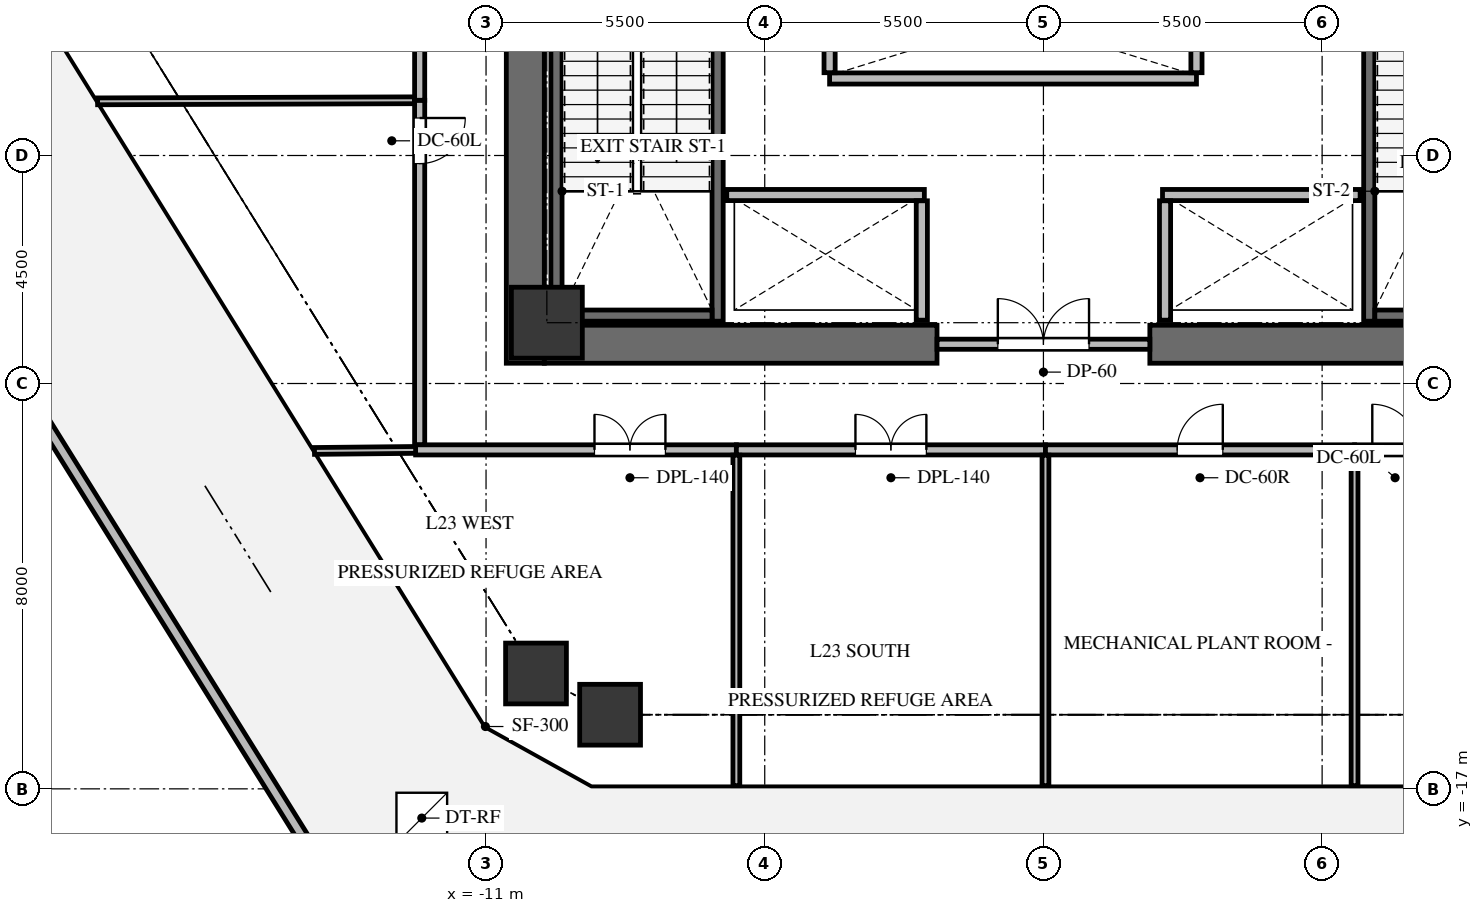
"""IFC4 building model, lengths in metres.
Left out: names, types, materials, properties, quantities, classifications, styles, units other than length and angle.
Written with IfcOpenShell. Run it as: python <this file> out.ifc"""

import sys

from ifc_helpers import new_model, si_unit, direction, frame, frame_2d, origin, origin_2d, place, context, subcontext, project, spatial, rectangle, extrude, source, transform, mapped, element, fill, save


model = new_model("IFC4")
c1 = context("Model", 3, precision=1e-05, world=origin(), true_north=direction((0.0, 1.0)))
c2 = subcontext(c1, "Body", "Model", "MODEL_VIEW")
j1 = project(units=[si_unit("LENGTHUNIT", "METRE"), si_unit("PLANEANGLEUNIT", "RADIAN")], contexts=[c1])
p1 = place(None, origin())
s1 = spatial("IfcSite", under=j1, at=p1, CompositionType="ELEMENT")
p2 = place(p1, origin())
s2 = spatial("IfcBuilding", under=s1, at=p2, CompositionType="ELEMENT")
p3 = place(p2, frame((0.0, 0.0, 88.5)))
s3 = spatial("IfcBuildingStorey", under=s2, at=p3, CompositionType="ELEMENT", Elevation=88.5)
p4 = place(p3, frame((-10.225, -8.6, 0.0), z_axis=(0.0, 0.0, 1.0), x_axis=(0.0, 1.0, 0.0)))
e1 = element("IfcWall", 1, at=p4, inside=s3, PredefinedType="SHEAR", context=c2, shape_type="SweptSolid", body=[
    extrude(rectangle(XDim=17.2, YDim=0.75, at=frame_2d((8.6, 0.0))), origin(), (0.0, 0.0, 1.0), 4.8),
])
for number, where, z_axis, x_axis in (
    (2, (-9.85, -8.225, 0.0), (0.0, 0.0, 1.0), (1.0, 0.0, 0.0)),
    (3, (2.1, -8.225, 0.0), (0.0, 0.0, 1.0), (1.0, 0.0, 0.0)),
):
    element("IfcWall", number, at=place(p3, frame(where, z_axis=z_axis, x_axis=x_axis)), inside=s3, PredefinedType="SHEAR", context=c2, shape_type="SweptSolid", body=[
        extrude(rectangle(XDim=7.75, YDim=0.75, at=frame_2d((3.875, 0.0))), origin(), (0.0, 0.0, 1.0), 4.8),
    ])
p5 = place(p3, frame((-6.43, -7.77, -0.3), z_axis=(0.0, 0.0, 1.0), x_axis=(0.0, 1.0, 0.0)))
e4 = element("IfcWall", 4, at=p5, inside=s3, PredefinedType="SHEAR", context=c2, shape_type="SweptSolid", body=[
    extrude(rectangle(XDim=7.89, YDim=0.22, at=frame_2d((3.945, 0.0))), origin(), (0.0, 0.0, 1.0), 4.8),
])
p6 = place(p5, frame((6.32, 0.0, 0.0)))
e5 = element("IfcOpeningElement", 5, at=p6, cuts=e4, PredefinedType="OPENING", context=c2, shape_type="SweptSolid", body=[
    extrude(rectangle(XDim=1.05, YDim=2.15, at=frame_2d((0.525, 1.075))), frame((0.0, 0.12, 0.0), z_axis=(0.0, -1.0, 0.0), x_axis=(1.0, 0.0, 0.0)), (0.0, 0.0, 1.0), 0.24),
])
p7 = place(p3, frame((-9.61, 0.12, -0.3), z_axis=(0.0, 0.0, 1.0), x_axis=(0.0, -1.0, 0.0)))
e6 = element("IfcWall", 6, at=p7, inside=s3, PredefinedType="SHEAR", context=c2, shape_type="SweptSolid", body=[
    extrude(rectangle(XDim=7.89, YDim=0.22, at=frame_2d((3.945, 0.0))), origin(), (0.0, 0.0, 1.0), 4.8),
])
p8 = place(p3, frame((-9.5, -7.66, -0.3), z_axis=(0.0, 0.0, 1.0), x_axis=(1.0, 0.0, 0.0)))
e7 = element("IfcWall", 7, at=p8, inside=s3, PredefinedType="SHEAR", context=c2, shape_type="SweptSolid", body=[
    extrude(rectangle(XDim=2.96, YDim=0.22, at=frame_2d((1.48, 0.0))), origin(), (0.0, 0.0, 1.0), 4.8),
])
p9 = place(p3, frame((6.43, 0.12, -0.3), z_axis=(0.0, 0.0, 1.0), x_axis=(0.0, -1.0, 0.0)))
e8 = element("IfcWall", 8, at=p9, inside=s3, PredefinedType="SHEAR", context=c2, shape_type="SweptSolid", body=[
    extrude(rectangle(XDim=7.89, YDim=0.22, at=frame_2d((3.945, 0.0))), origin(), (0.0, 0.0, 1.0), 4.8),
])
p10 = place(p9, frame((0.52, 0.0, 0.0)))
e9 = element("IfcOpeningElement", 9, at=p10, cuts=e8, PredefinedType="OPENING", context=c2, shape_type="SweptSolid", body=[
    extrude(rectangle(XDim=1.05, YDim=2.15, at=frame_2d((0.525, 1.075))), frame((0.0, 0.12, 0.0), z_axis=(0.0, -1.0, 0.0), x_axis=(1.0, 0.0, 0.0)), (0.0, 0.0, 1.0), 0.24),
])
p11 = place(p3, frame((6.54, -7.66, -0.3), z_axis=(0.0, 0.0, 1.0), x_axis=(1.0, 0.0, 0.0)))
e10 = element("IfcWall", 10, at=p11, inside=s3, PredefinedType="SHEAR", context=c2, shape_type="SweptSolid", body=[
    extrude(rectangle(XDim=2.96, YDim=0.22, at=frame_2d((1.48, 0.0))), origin(), (0.0, 0.0, 1.0), 4.8),
])
m1 = source(origin(), c2, "Body", "SweptSolid", [
    extrude(rectangle(XDim=1.4, YDim=1.4, at=origin_2d()), origin(), (0.0, 0.0, 1.0), 4.8),
])
p12 = place(p3, frame((-9.8, -7.8, -0.3), z_axis=(0.0, 0.0, 1.0), x_axis=(1.0, 0.0, 0.0)))
e11 = element("IfcColumn", 11, at=p12, inside=s3, PredefinedType="COLUMN", context=c2, shape_type="MappedRepresentation", body=[
    mapped(m1, transform((0.0, 0.0, 0.0), x_axis=(1.0, 0.0, 0.0), y_axis=(0.0, 1.0, 0.0), z_axis=(0.0, 0.0, 1.0), scale=1.0)),
])
m2 = source(origin(), c2, "Body", "SweptSolid", [
    extrude(rectangle(XDim=1.2, YDim=1.2, at=origin_2d()), origin(), (0.0, 0.0, 1.0), 4.8),
])
for number, where, z_axis, x_axis in (
    (12, (-10.014, -14.723, -0.3), (0.0, 0.0, 1.0), (1.0, 0.0, 0.0)),
    (13, (-8.552, -15.537, -0.3), (0.0, 0.0, 1.0), (1.0, 0.0, 0.0)),
):
    element("IfcColumn", number, at=place(p3, frame(where, z_axis=z_axis, x_axis=x_axis)), inside=s3, PredefinedType="COLUMN", context=c2, shape_type="MappedRepresentation", body=[
        mapped(m2, transform((0.0, 0.0, 0.0), x_axis=(1.0, 0.0, 0.0), y_axis=(0.0, 1.0, 0.0), z_axis=(0.0, 0.0, 1.0), scale=1.0)),
    ])
p13 = place(p3, frame((-13.901, -19.104, 0.0), z_axis=(0.0, 0.0, 1.0), x_axis=(-0.528591126558, 0.848876564009, 0.0)))
e14 = element("IfcWall", 14, at=p13, inside=s3, PredefinedType="PARAPET", context=c2, shape_type="SweptSolid", body=[
    extrude(rectangle(XDim=21.741, YDim=0.22, at=frame_2d((10.871, 0.0))), origin(), (0.0, 0.0, 1.0), 1.2),
])
p14 = place(p3, frame((-2.1, -8.225, 0.0), z_axis=(0.0, 0.0, 1.0), x_axis=(1.0, 0.0, 0.0)))
e15 = element("IfcWall", 15, at=p14, inside=s3, PredefinedType="SOLIDWALL", context=c2, shape_type="SweptSolid", body=[
    extrude(rectangle(XDim=4.2, YDim=0.2, at=frame_2d((2.1, 0.0))), origin(), (0.0, 0.0, 1.0), 4.485),
])
p15 = place(p14, frame((1.2, 0.0, 0.0)))
e16 = element("IfcOpeningElement", 16, at=p15, cuts=e15, PredefinedType="OPENING", context=c2, shape_type="SweptSolid", body=[
    extrude(rectangle(XDim=1.8, YDim=2.15, at=frame_2d((0.9, 1.075))), frame((0.0, 0.11, 0.0), z_axis=(0.0, -1.0, 0.0), x_axis=(1.0, 0.0, 0.0)), (0.0, 0.0, 1.0), 0.22),
])
for number, where, z_axis, x_axis in (
    (17, (-6.25, -5.28, 0.0), (0.0, 0.0, 1.0), (1.0, 0.0, 0.0)),
    (18, (2.35, -5.28, 0.0), (0.0, 0.0, 1.0), (1.0, 0.0, 0.0)),
):
    element("IfcWall", number, at=place(p3, frame(where, z_axis=z_axis, x_axis=x_axis)), inside=s3, PredefinedType="SOLIDWALL", context=c2, shape_type="SweptSolid", body=[
        extrude(rectangle(XDim=3.9, YDim=0.22, at=frame_2d((1.95, 0.0))), origin(), (0.0, 0.0, 1.0), 4.485),
    ])
for number, where, z_axis, x_axis in (
    (19, (-2.4, -7.75, 0.0), (0.0, 0.0, 1.0), (0.0, 1.0, 0.0)),
    (20, (2.4, -7.75, 0.0), (0.0, 0.0, 1.0), (0.0, 1.0, 0.0)),
):
    element("IfcWall", number, at=place(p3, frame(where, z_axis=z_axis, x_axis=x_axis)), inside=s3, PredefinedType="SOLIDWALL", context=c2, shape_type="SweptSolid", body=[
        extrude(rectangle(XDim=2.356, YDim=0.22, at=frame_2d((1.178, 0.0))), origin(), (0.0, 0.0, 1.0), 4.485),
    ])
p16 = place(p3, frame((-4.22, -2.98, 0.0), z_axis=(0.0, 0.0, 1.0), x_axis=(1.0, 0.0, 0.0)))
e21 = element("IfcWall", 21, at=p16, inside=s3, PredefinedType="SOLIDWALL", context=c2, shape_type="SweptSolid", body=[
    extrude(rectangle(XDim=7.24, YDim=0.22, at=frame_2d((3.62, 0.0))), origin(), (0.0, 0.0, 1.0), 4.485),
])
for number, where, z_axis, x_axis in (
    (22, (-4.22, -2.866, 0.0), (0.0, 0.0, 1.0), (0.0, 1.0, 0.0)),
    (23, (3.02, -2.866, 0.0), (0.0, 0.0, 1.0), (0.0, 1.0, 0.0)),
):
    element("IfcWall", number, at=place(p3, frame(where, z_axis=z_axis, x_axis=x_axis)), inside=s3, PredefinedType="SOLIDWALL", context=c2, shape_type="SweptSolid", body=[
        extrude(rectangle(XDim=2.132, YDim=0.22, at=frame_2d((1.066, 0.0))), origin(), (0.0, 0.0, 1.0), 4.485),
    ])
p17 = place(p3, frame((-12.39, -10.31, 0.0), z_axis=(0.0, 0.0, 1.0), x_axis=(1.0, 0.0, 0.0)))
e24 = element("IfcWall", 24, at=p17, inside=s3, PredefinedType="SOLIDWALL", context=c2, shape_type="SweptSolid", body=[
    extrude(rectangle(XDim=6.33, YDim=0.2, at=frame_2d((3.165, 0.0))), origin(), (0.0, 0.0, 1.0), 4.485),
])
p18 = place(p17, frame((3.53, 0.0, 0.0)))
e25 = element("IfcOpeningElement", 25, at=p18, cuts=e24, PredefinedType="OPENING", context=c2, shape_type="SweptSolid", body=[
    extrude(rectangle(XDim=1.4, YDim=2.15, at=frame_2d((0.7, 1.075))), frame((0.0, 0.11, 0.0), z_axis=(0.0, -1.0, 0.0), x_axis=(1.0, 0.0, 0.0)), (0.0, 0.0, 1.0), 0.22),
])
p19 = place(p3, frame((-6.06, -10.31, 0.0), z_axis=(0.0, 0.0, 1.0), x_axis=(1.0, 0.0, 0.0)))
e26 = element("IfcWall", 26, at=p19, inside=s3, PredefinedType="SOLIDWALL", context=c2, shape_type="SweptSolid", body=[
    extrude(rectangle(XDim=6.1, YDim=0.2, at=frame_2d((3.05, 0.0))), origin(), (0.0, 0.0, 1.0), 3.652),
])
p20 = place(p19, frame((2.35, 0.0, 0.0)))
e27 = element("IfcOpeningElement", 27, at=p20, cuts=e26, PredefinedType="OPENING", context=c2, shape_type="SweptSolid", body=[
    extrude(rectangle(XDim=1.4, YDim=2.15, at=frame_2d((0.7, 1.075))), frame((0.0, 0.11, 0.0), z_axis=(0.0, -1.0, 0.0), x_axis=(1.0, 0.0, 0.0)), (0.0, 0.0, 1.0), 0.22),
])
p21 = place(p3, frame((0.04, -10.31, 0.0), z_axis=(0.0, 0.0, 1.0), x_axis=(1.0, 0.0, 0.0)))
e28 = element("IfcWall", 28, at=p21, inside=s3, PredefinedType="SOLIDWALL", context=c2, shape_type="SweptSolid", body=[
    extrude(rectangle(XDim=6.1, YDim=0.2, at=frame_2d((3.05, 0.0))), origin(), (0.0, 0.0, 1.0), 3.652),
])
p22 = place(p21, frame((2.6, 0.0, 0.0)))
e29 = element("IfcOpeningElement", 29, at=p22, cuts=e28, PredefinedType="OPENING", context=c2, shape_type="SweptSolid", body=[
    extrude(rectangle(XDim=0.9, YDim=2.05, at=frame_2d((0.45, 1.025))), frame((0.0, 0.11, 0.0), z_axis=(0.0, -1.0, 0.0), x_axis=(1.0, 0.0, 0.0)), (0.0, 0.0, 1.0), 0.22),
])
p23 = place(p3, frame((6.14, -10.31, 0.0), z_axis=(0.0, 0.0, 1.0), x_axis=(1.0, 0.0, 0.0)))
e30 = element("IfcWall", 30, at=p23, inside=s3, PredefinedType="SOLIDWALL", context=c2, shape_type="SweptSolid", body=[
    extrude(rectangle(XDim=6.25, YDim=0.2, at=frame_2d((3.125, 0.0))), origin(), (0.0, 0.0, 1.0), 3.652),
])
p24 = place(p23, frame((0.35, 0.0, 0.0)))
e31 = element("IfcOpeningElement", 31, at=p24, cuts=e30, PredefinedType="OPENING", context=c2, shape_type="SweptSolid", body=[
    extrude(rectangle(XDim=0.9, YDim=2.05, at=frame_2d((0.45, 1.025))), frame((0.0, 0.11, 0.0), z_axis=(0.0, -1.0, 0.0), x_axis=(1.0, 0.0, 0.0)), (0.0, 0.0, 1.0), 0.22),
])
p25 = place(p3, frame((-12.31, -3.41, 0.0), z_axis=(0.0, 0.0, 1.0), x_axis=(0.0, -1.0, 0.0)))
e32 = element("IfcWall", 32, at=p25, inside=s3, PredefinedType="SOLIDWALL", context=c2, shape_type="SweptSolid", body=[
    extrude(rectangle(XDim=6.796, YDim=0.2, at=frame_2d((3.398, 0.0))), origin(), (0.0, 0.0, 1.0), 4.485),
])
p26 = place(p25, frame((0.35, 0.0, 0.0)))
e33 = element("IfcOpeningElement", 33, at=p26, cuts=e32, PredefinedType="OPENING", context=c2, shape_type="SweptSolid", body=[
    extrude(rectangle(XDim=0.9, YDim=2.05, at=frame_2d((0.45, 1.025))), frame((0.0, 0.11, 0.0), z_axis=(0.0, -1.0, 0.0), x_axis=(1.0, 0.0, 0.0)), (0.0, 0.0, 1.0), 0.22),
])
p27 = place(p3, frame((-12.31, 3.49, 0.0), z_axis=(0.0, 0.0, 1.0), x_axis=(0.0, -1.0, 0.0)))
e34 = element("IfcWall", 34, at=p27, inside=s3, PredefinedType="SOLIDWALL", context=c2, shape_type="SweptSolid", body=[
    extrude(rectangle(XDim=6.9, YDim=0.2, at=frame_2d((3.45, 0.0))), origin(), (0.0, 0.0, 1.0), 3.652),
])
p28 = place(p27, frame((3.0, 0.0, 0.0)))
e35 = element("IfcOpeningElement", 35, at=p28, cuts=e34, PredefinedType="OPENING", context=c2, shape_type="SweptSolid", body=[
    extrude(rectangle(XDim=0.9, YDim=2.05, at=frame_2d((0.45, 1.025))), frame((0.0, 0.11, 0.0), z_axis=(0.0, -1.0, 0.0), x_axis=(1.0, 0.0, 0.0)), (0.0, 0.0, 1.0), 0.22),
])
p29 = place(p3, frame((-6.06, -10.414, 0.0), z_axis=(0.0, 0.0, 1.0), x_axis=(0.0, -1.0, 0.0)))
e36 = element("IfcWall", 36, at=p29, inside=s3, PredefinedType="PARTITIONING", context=c2, shape_type="SweptSolid", body=[
    extrude(rectangle(XDim=6.523, YDim=0.135, at=frame_2d((3.261, 0.0))), origin(), (0.0, 0.0, 1.0), 3.652),
])
p30 = place(p3, frame((-14.386, -10.331, 0.0), z_axis=(0.0, 0.0, 1.0), x_axis=(0.999948475847, 0.010151140349, 0.0)))
e37 = element("IfcWall", 37, at=p30, inside=s3, PredefinedType="PARTITIONING", context=c2, shape_type="SweptSolid", body=[
    extrude(rectangle(XDim=1.996, YDim=0.135, at=frame_2d((0.998, 0.0))), origin(), (0.0, 0.0, 1.0), 3.82),
])
p31 = place(p3, frame((0.04, -10.414, 0.0), z_axis=(0.0, 0.0, 1.0), x_axis=(0.0, -1.0, 0.0)))
e38 = element("IfcWall", 38, at=p31, inside=s3, PredefinedType="PARTITIONING", context=c2, shape_type="SweptSolid", body=[
    extrude(rectangle(XDim=6.523, YDim=0.135, at=frame_2d((3.261, 0.0))), origin(), (0.0, 0.0, 1.0), 3.82),
])
p32 = place(p3, frame((6.14, -10.414, 0.0), z_axis=(0.0, 0.0, 1.0), x_axis=(0.0, -1.0, 0.0)))
e39 = element("IfcWall", 39, at=p32, inside=s3, PredefinedType="PARTITIONING", context=c2, shape_type="SweptSolid", body=[
    extrude(rectangle(XDim=6.523, YDim=0.135, at=frame_2d((3.261, 0.0))), origin(), (0.0, 0.0, 1.0), 3.652),
])
p33 = place(p3, frame((-18.666, -3.431, 0.0), z_axis=(0.0, 0.0, 1.0), x_axis=(0.999994491252, 0.003319256941, 0.0)))
e40 = element("IfcWall", 40, at=p33, inside=s3, PredefinedType="PARTITIONING", context=c2, shape_type="SweptSolid", body=[
    extrude(rectangle(XDim=6.252, YDim=0.135, at=frame_2d((3.126, 0.0))), origin(), (0.0, 0.0, 1.0), 3.82),
])
p34 = place(p3, frame((0.0, 0.0, -0.28)))
p35 = place(p34, frame((-17.56, -9.361, -0.01)))
p36 = place(p35, frame((0.0, 0.0, 0.24)))
e41 = element("IfcWindow", 41, at=p36, inside=s3, PartitioningType="SINGLE_PANEL", PredefinedType="SKYLIGHT", context=c2, shape_type="SweptSolid", body=[
    extrude(rectangle(XDim=1.2, YDim=1.2, at=origin_2d()), origin(), (0.0, 0.0, 1.0), 0.05),
])
p37 = place(p34, frame((-12.268, -17.577, -0.01)))
p38 = place(p37, frame((0.0, 0.0, 0.24)))
e42 = element("IfcDoor", 42, at=p38, inside=s3, OperationType="SINGLE_SWING_LEFT", PredefinedType="TRAPDOOR", context=c2, shape_type="SweptSolid", body=[
    extrude(rectangle(XDim=1.0, YDim=1.0, at=origin_2d()), origin(), (0.0, 0.0, 1.0), 0.05),
])
m3 = source(origin(), c2, "Body", "SweptSolid", [
    extrude(rectangle(XDim=1.8, YDim=2.15, at=frame_2d((0.9, 1.075))), frame((0.0, 0.025, 0.0), z_axis=(0.0, -1.0, 0.0), x_axis=(1.0, 0.0, 0.0)), (0.0, 0.0, 1.0), 0.05),
])
p39 = place(p15, origin())
e43 = element("IfcDoor", 43, at=p39, inside=s3, OperationType="DOUBLE_DOOR_SINGLE_SWING", PredefinedType="DOOR", context=c2, shape_type="MappedRepresentation", body=[
    mapped(m3, transform((0.0, 0.0, 0.0), x_axis=(1.0, 0.0, 0.0), y_axis=(0.0, 1.0, 0.0), z_axis=(0.0, 0.0, 1.0), scale=1.0)),
])
fill(e16, e43)
m4 = source(origin(), c2, "Body", "SweptSolid", [
    extrude(rectangle(XDim=1.4, YDim=2.15, at=frame_2d((0.7, 1.075))), frame((0.0, 0.025, 0.0), z_axis=(0.0, -1.0, 0.0), x_axis=(1.0, 0.0, 0.0)), (0.0, 0.0, 1.0), 0.05),
])
p40 = place(p18, origin())
e44 = element("IfcDoor", 44, at=p40, inside=s3, OperationType="DOUBLE_DOOR_SINGLE_SWING", PredefinedType="DOOR", context=c2, shape_type="MappedRepresentation", body=[
    mapped(m4, transform((0.0, 0.0, 0.0), x_axis=(1.0, 0.0, 0.0), y_axis=(0.0, 1.0, 0.0), z_axis=(0.0, 0.0, 1.0), scale=1.0)),
])
fill(e25, e44)
p41 = place(p20, origin())
e45 = element("IfcDoor", 45, at=p41, inside=s3, OperationType="DOUBLE_DOOR_SINGLE_SWING", PredefinedType="DOOR", context=c2, shape_type="MappedRepresentation", body=[
    mapped(m4, transform((0.0, 0.0, 0.0), x_axis=(1.0, 0.0, 0.0), y_axis=(0.0, 1.0, 0.0), z_axis=(0.0, 0.0, 1.0), scale=1.0)),
])
fill(e27, e45)
m5 = source(origin(), c2, "Body", "SweptSolid", [
    extrude(rectangle(XDim=0.9, YDim=2.05, at=frame_2d((0.45, 1.025))), frame((0.0, 0.025, 0.0), z_axis=(0.0, -1.0, 0.0), x_axis=(1.0, 0.0, 0.0)), (0.0, 0.0, 1.0), 0.05),
])
p42 = place(p22, origin())
e46 = element("IfcDoor", 46, at=p42, inside=s3, OperationType="SINGLE_SWING_RIGHT", PredefinedType="DOOR", context=c2, shape_type="MappedRepresentation", body=[
    mapped(m5, transform((0.0, 0.0, 0.0), x_axis=(1.0, 0.0, 0.0), y_axis=(0.0, 1.0, 0.0), z_axis=(0.0, 0.0, 1.0), scale=1.0)),
])
fill(e29, e46)
m6 = source(origin(), c2, "Body", "SweptSolid", [
    extrude(rectangle(XDim=0.9, YDim=2.05, at=frame_2d((0.45, 1.025))), frame((0.0, 0.025, 0.0), z_axis=(0.0, -1.0, 0.0), x_axis=(1.0, 0.0, 0.0)), (0.0, 0.0, 1.0), 0.05),
])
p43 = place(p24, origin())
e47 = element("IfcDoor", 47, at=p43, inside=s3, OperationType="SINGLE_SWING_LEFT", PredefinedType="DOOR", context=c2, shape_type="MappedRepresentation", body=[
    mapped(m6, transform((0.0, 0.0, 0.0), x_axis=(1.0, 0.0, 0.0), y_axis=(0.0, 1.0, 0.0), z_axis=(0.0, 0.0, 1.0), scale=1.0)),
])
fill(e31, e47)
p44 = place(p26, origin())
e48 = element("IfcDoor", 48, at=p44, inside=s3, OperationType="SINGLE_SWING_LEFT", PredefinedType="DOOR", context=c2, shape_type="MappedRepresentation", body=[
    mapped(m6, transform((0.0, 0.0, 0.0), x_axis=(1.0, 0.0, 0.0), y_axis=(0.0, 1.0, 0.0), z_axis=(0.0, 0.0, 1.0), scale=1.0)),
])
fill(e33, e48)
save(model, sys.argv[1])
